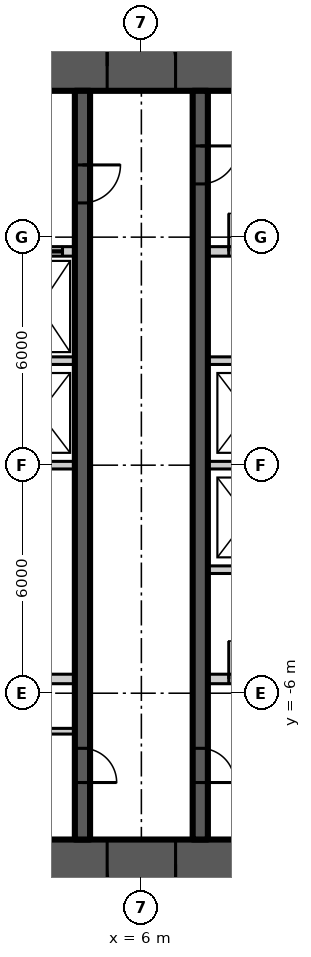
"""IFC4 building model, lengths in metres.
Left out: names, types, materials, properties, quantities, classifications, styles, units other than length and angle.
Written with IfcOpenShell. Run it as: python <this file> out.ifc"""

import sys

from ifc_helpers import new_model, si_unit, direction, frame, frame_2d, origin, place, context, subcontext, project, spatial, rectangle, extrude, element, fill, save


model = new_model("IFC4")
c1 = context("Model", 3, precision=1e-05, world=origin(), true_north=direction((0.0, 1.0)))
c2 = subcontext(c1, "Body", "Model", "MODEL_VIEW")
j1 = project(units=[si_unit("LENGTHUNIT", "METRE"), si_unit("PLANEANGLEUNIT", "RADIAN")], contexts=[c1])
p1 = place(None, origin())
s1 = spatial("IfcSite", under=j1, at=p1, CompositionType="ELEMENT")
p2 = place(p1, origin())
s2 = spatial("IfcBuilding", under=s1, at=p2, CompositionType="ELEMENT")
p3 = place(p2, frame((0.0, 0.0, 255.6)))
s3 = spatial("IfcBuildingStorey", under=s2, at=p3, CompositionType="ELEMENT", Elevation=255.6)
p4 = place(p3, frame((-11.15, 10.5, 0.0), z_axis=(0.0, 0.0, 1.0), x_axis=(1.0, 0.0, 0.0)))
e1 = element("IfcWall", 1, at=p4, inside=s3, PredefinedType="SHEAR", context=c2, shape_type="SweptSolid", body=[
    extrude(rectangle(XDim=22.3, YDim=1.3, at=frame_2d((11.15, 0.0))), origin(), (0.0, 0.0, 1.0), 3.9),
])
p5 = place(p4, frame((4.25, 0.0, 0.0)))
e2 = element("IfcOpeningElement", 2, at=p5, cuts=e1, PredefinedType="OPENING", context=c2, shape_type="SweptSolid", body=[
    extrude(rectangle(XDim=1.8, YDim=2.2, at=frame_2d((0.9, 1.1))), frame((0.0, 0.66, 0.0), z_axis=(0.0, -1.0, 0.0), x_axis=(1.0, 0.0, 0.0)), (0.0, 0.0, 1.0), 1.32),
])
p6 = place(p4, frame((16.25, 0.0, 0.0)))
e3 = element("IfcOpeningElement", 3, at=p6, cuts=e1, PredefinedType="OPENING", context=c2, shape_type="SweptSolid", body=[
    extrude(rectangle(XDim=1.8, YDim=2.2, at=frame_2d((0.9, 1.1))), frame((0.0, 0.66, 0.0), z_axis=(0.0, -1.0, 0.0), x_axis=(1.0, 0.0, 0.0)), (0.0, 0.0, 1.0), 1.32),
])
p7 = place(p3, frame((11.15, -10.5, 0.0), z_axis=(0.0, 0.0, 1.0), x_axis=(-1.0, 0.0, 0.0)))
e4 = element("IfcWall", 4, at=p7, inside=s3, PredefinedType="SHEAR", context=c2, shape_type="SweptSolid", body=[
    extrude(rectangle(XDim=22.3, YDim=1.3, at=frame_2d((11.15, 0.0))), origin(), (0.0, 0.0, 1.0), 3.9),
])
p8 = place(p7, frame((16.25, 0.0, 0.0)))
e5 = element("IfcOpeningElement", 5, at=p8, cuts=e4, PredefinedType="OPENING", context=c2, shape_type="SweptSolid", body=[
    extrude(rectangle(XDim=1.8, YDim=2.2, at=frame_2d((0.9, 1.1))), frame((0.0, 0.66, 0.0), z_axis=(0.0, -1.0, 0.0), x_axis=(1.0, 0.0, 0.0)), (0.0, 0.0, 1.0), 1.32),
])
p9 = place(p7, frame((4.25, 0.0, 0.0)))
e6 = element("IfcOpeningElement", 6, at=p9, cuts=e4, PredefinedType="OPENING", context=c2, shape_type="SweptSolid", body=[
    extrude(rectangle(XDim=1.8, YDim=2.2, at=frame_2d((0.9, 1.1))), frame((0.0, 0.66, 0.0), z_axis=(0.0, -1.0, 0.0), x_axis=(1.0, 0.0, 0.0)), (0.0, 0.0, 1.0), 1.32),
])
p10 = place(p3, frame((7.55, 9.85, 0.0), z_axis=(0.0, 0.0, 1.0), x_axis=(0.0, -1.0, 0.0)))
e7 = element("IfcWall", 7, at=p10, inside=s3, PredefinedType="SHEAR", context=c2, shape_type="SweptSolid", body=[
    extrude(rectangle(XDim=19.7, YDim=0.4, at=frame_2d((9.85, 0.0))), origin(), (0.0, 0.0, 1.0), 3.9),
])
p11 = place(p10, frame((1.45, 0.0, 0.0)))
e8 = element("IfcOpeningElement", 8, at=p11, cuts=e7, PredefinedType="OPENING", context=c2, shape_type="SweptSolid", body=[
    extrude(rectangle(XDim=1.0, YDim=2.2, at=frame_2d((0.5, 1.1))), frame((0.0, 0.21, 0.0), z_axis=(0.0, -1.0, 0.0), x_axis=(1.0, 0.0, 0.0)), (0.0, 0.0, 1.0), 0.42),
])
p12 = place(p10, frame((17.3, 0.0, 0.0)))
e9 = element("IfcOpeningElement", 9, at=p12, cuts=e7, PredefinedType="OPENING", context=c2, shape_type="SweptSolid", body=[
    extrude(rectangle(XDim=0.9, YDim=2.1, at=frame_2d((0.45, 1.05))), frame((0.0, 0.21, 0.0), z_axis=(0.0, -1.0, 0.0), x_axis=(1.0, 0.0, 0.0)), (0.0, 0.0, 1.0), 0.42),
])
p13 = place(p3, frame((4.45, 9.85, 0.0), z_axis=(0.0, 0.0, 1.0), x_axis=(0.0, -1.0, 0.0)))
e10 = element("IfcWall", 10, at=p13, inside=s3, PredefinedType="SHEAR", context=c2, shape_type="SweptSolid", body=[
    extrude(rectangle(XDim=19.7, YDim=0.4, at=frame_2d((9.85, 0.0))), origin(), (0.0, 0.0, 1.0), 3.9),
])
p14 = place(p13, frame((1.95, 0.0, 0.0)))
e11 = element("IfcOpeningElement", 11, at=p14, cuts=e10, PredefinedType="OPENING", context=c2, shape_type="SweptSolid", body=[
    extrude(rectangle(XDim=1.0, YDim=2.2, at=frame_2d((0.5, 1.1))), frame((0.0, 0.21, 0.0), z_axis=(0.0, -1.0, 0.0), x_axis=(1.0, 0.0, 0.0)), (0.0, 0.0, 1.0), 0.42),
])
p15 = place(p13, frame((17.3, 0.0, 0.0)))
e12 = element("IfcOpeningElement", 12, at=p15, cuts=e10, PredefinedType="OPENING", context=c2, shape_type="SweptSolid", body=[
    extrude(rectangle(XDim=0.9, YDim=2.1, at=frame_2d((0.45, 1.05))), frame((0.0, 0.21, 0.0), z_axis=(0.0, -1.0, 0.0), x_axis=(1.0, 0.0, 0.0)), (0.0, 0.0, 1.0), 0.42),
])
p16 = place(p3, frame((2.4, 5.625, 0.0), z_axis=(0.0, 0.0, 1.0), x_axis=(1.0, 0.0, 0.0)))
e13 = element("IfcWall", 13, at=p16, inside=s3, PredefinedType="SOLIDWALL", context=c2, shape_type="SweptSolid", body=[
    extrude(rectangle(XDim=1.85, YDim=0.25, at=frame_2d((0.925, 0.0))), origin(), (0.0, 0.0, 1.0), 3.7),
])
p17 = place(p16, frame((0.325, 0.0, 0.0)))
e14 = element("IfcOpeningElement", 14, at=p17, cuts=e13, PredefinedType="OPENING", context=c2, shape_type="SweptSolid", body=[
    extrude(rectangle(XDim=1.2, YDim=2.2, at=frame_2d((0.6, 1.1))), frame((0.0, 0.135, 0.0), z_axis=(0.0, -1.0, 0.0), x_axis=(1.0, 0.0, 0.0)), (0.0, 0.0, 1.0), 0.27),
])
p18 = place(p3, frame((7.75, 5.625, 0.0), z_axis=(0.0, 0.0, 1.0), x_axis=(1.0, 0.0, 0.0)))
e15 = element("IfcWall", 15, at=p18, inside=s3, PredefinedType="SOLIDWALL", context=c2, shape_type="SweptSolid", body=[
    extrude(rectangle(XDim=2.1, YDim=0.25, at=frame_2d((1.05, 0.0))), origin(), (0.0, 0.0, 1.0), 3.7),
])
p19 = place(p18, frame((0.55, 0.0, 0.0)))
e16 = element("IfcOpeningElement", 16, at=p19, cuts=e15, PredefinedType="OPENING", context=c2, shape_type="SweptSolid", body=[
    extrude(rectangle(XDim=1.0, YDim=2.2, at=frame_2d((0.5, 1.1))), frame((0.0, 0.135, 0.0), z_axis=(0.0, -1.0, 0.0), x_axis=(1.0, 0.0, 0.0)), (0.0, 0.0, 1.0), 0.27),
])
p20 = place(p3, frame((2.4, -5.625, 0.0), z_axis=(0.0, 0.0, 1.0), x_axis=(1.0, 0.0, 0.0)))
e17 = element("IfcWall", 17, at=p20, inside=s3, PredefinedType="SOLIDWALL", context=c2, shape_type="SweptSolid", body=[
    extrude(rectangle(XDim=1.85, YDim=0.25, at=frame_2d((0.925, 0.0))), origin(), (0.0, 0.0, 1.0), 3.7),
])
p21 = place(p3, frame((7.75, -5.625, 0.0), z_axis=(0.0, 0.0, 1.0), x_axis=(1.0, 0.0, 0.0)))
e18 = element("IfcWall", 18, at=p21, inside=s3, PredefinedType="SOLIDWALL", context=c2, shape_type="SweptSolid", body=[
    extrude(rectangle(XDim=2.1, YDim=0.25, at=frame_2d((1.05, 0.0))), origin(), (0.0, 0.0, 1.0), 3.7),
])
p22 = place(p21, frame((0.55, 0.0, 0.0)))
e19 = element("IfcOpeningElement", 19, at=p22, cuts=e18, PredefinedType="OPENING", context=c2, shape_type="SweptSolid", body=[
    extrude(rectangle(XDim=1.0, YDim=2.2, at=frame_2d((0.5, 1.1))), frame((0.0, 0.135, 0.0), z_axis=(0.0, -1.0, 0.0), x_axis=(1.0, 0.0, 0.0)), (0.0, 0.0, 1.0), 0.27),
])
p23 = place(p3, frame((7.75, -2.75, 0.0), z_axis=(0.0, 0.0, 1.0), x_axis=(1.0, 0.0, 0.0)))
e20 = element("IfcWall", 20, at=p23, inside=s3, PredefinedType="SOLIDWALL", context=c2, shape_type="SweptSolid", body=[
    extrude(rectangle(XDim=2.1, YDim=0.2, at=frame_2d((1.05, 0.0))), origin(), (0.0, 0.0, 1.0), 3.7),
])
p24 = place(p3, frame((2.4, 0.0, 0.0), z_axis=(0.0, 0.0, 1.0), x_axis=(1.0, 0.0, 0.0)))
e21 = element("IfcWall", 21, at=p24, inside=s3, PredefinedType="SOLIDWALL", context=c2, shape_type="SweptSolid", body=[
    extrude(rectangle(XDim=1.85, YDim=0.2, at=frame_2d((0.925, 0.0))), origin(), (0.0, 0.0, 1.0), 3.7),
])
p25 = place(p3, frame((7.75, 0.0, 0.0), z_axis=(0.0, 0.0, 1.0), x_axis=(1.0, 0.0, 0.0)))
e22 = element("IfcWall", 22, at=p25, inside=s3, PredefinedType="SOLIDWALL", context=c2, shape_type="SweptSolid", body=[
    extrude(rectangle(XDim=2.1, YDim=0.2, at=frame_2d((1.05, 0.0))), origin(), (0.0, 0.0, 1.0), 3.7),
])
p26 = place(p3, frame((2.4, 2.75, 0.0), z_axis=(0.0, 0.0, 1.0), x_axis=(1.0, 0.0, 0.0)))
e23 = element("IfcWall", 23, at=p26, inside=s3, PredefinedType="SOLIDWALL", context=c2, shape_type="SweptSolid", body=[
    extrude(rectangle(XDim=1.85, YDim=0.2, at=frame_2d((0.925, 0.0))), origin(), (0.0, 0.0, 1.0), 3.7),
])
p27 = place(p3, frame((7.75, 2.75, 0.0), z_axis=(0.0, 0.0, 1.0), x_axis=(1.0, 0.0, 0.0)))
e24 = element("IfcWall", 24, at=p27, inside=s3, PredefinedType="SOLIDWALL", context=c2, shape_type="SweptSolid", body=[
    extrude(rectangle(XDim=2.1, YDim=0.2, at=frame_2d((1.05, 0.0))), origin(), (0.0, 0.0, 1.0), 3.7),
])
p28 = place(p3, frame((2.4, -7.0, 0.0), z_axis=(0.0, 0.0, 1.0), x_axis=(1.0, 0.0, 0.0)))
e25 = element("IfcWall", 25, at=p28, inside=s3, PredefinedType="SOLIDWALL", context=c2, shape_type="SweptSolid", body=[
    extrude(rectangle(XDim=1.85, YDim=0.15, at=frame_2d((0.925, 0.0))), origin(), (0.0, 0.0, 1.0), 3.77),
])
p29 = place(p28, frame((0.1, 0.0, 0.0)))
e26 = element("IfcOpeningElement", 26, at=p29, cuts=e25, PredefinedType="OPENING", context=c2, shape_type="SweptSolid", body=[
    extrude(rectangle(XDim=0.9, YDim=2.1, at=frame_2d((0.45, 1.05))), frame((0.0, 0.085, 0.0), z_axis=(0.0, -1.0, 0.0), x_axis=(1.0, 0.0, 0.0)), (0.0, 0.0, 1.0), 0.17),
])
p30 = place(p6, origin())
e27 = element("IfcDoor", 27, at=p30, inside=s3, OperationType="DOUBLE_DOOR_DOUBLE_SWING", PredefinedType="DOOR", context=c2, shape_type="SweptSolid", body=[
    extrude(rectangle(XDim=1.8, YDim=2.2, at=frame_2d((0.9, 1.1))), frame((0.0, 0.025, 0.0), z_axis=(0.0, -1.0, 0.0), x_axis=(1.0, 0.0, 0.0)), (0.0, 0.0, 1.0), 0.05),
])
fill(e3, e27)
p31 = place(p9, origin())
e28 = element("IfcDoor", 28, at=p31, inside=s3, OperationType="DOUBLE_DOOR_DOUBLE_SWING", PredefinedType="DOOR", context=c2, shape_type="SweptSolid", body=[
    extrude(rectangle(XDim=1.8, YDim=2.2, at=frame_2d((0.9, 1.1))), frame((0.0, 0.025, 0.0), z_axis=(0.0, -1.0, 0.0), x_axis=(1.0, 0.0, 0.0)), (0.0, 0.0, 1.0), 0.05),
])
fill(e6, e28)
p32 = place(p11, origin())
e29 = element("IfcDoor", 29, at=p32, inside=s3, OperationType="SINGLE_SWING_LEFT", PredefinedType="DOOR", context=c2, shape_type="SweptSolid", body=[
    extrude(rectangle(XDim=1.0, YDim=2.2, at=frame_2d((0.5, 1.1))), frame((0.0, 0.025, 0.0), z_axis=(0.0, -1.0, 0.0), x_axis=(1.0, 0.0, 0.0)), (0.0, 0.0, 1.0), 0.05),
])
fill(e8, e29)
p33 = place(p14, origin())
e30 = element("IfcDoor", 30, at=p33, inside=s3, OperationType="SINGLE_SWING_LEFT", PredefinedType="DOOR", context=c2, shape_type="SweptSolid", body=[
    extrude(rectangle(XDim=1.0, YDim=2.2, at=frame_2d((0.5, 1.1))), frame((0.0, 0.025, 0.0), z_axis=(0.0, -1.0, 0.0), x_axis=(1.0, 0.0, 0.0)), (0.0, 0.0, 1.0), 0.05),
])
fill(e11, e30)
p34 = place(p12, origin())
e31 = element("IfcDoor", 31, at=p34, inside=s3, OperationType="SINGLE_SWING_RIGHT", PredefinedType="DOOR", context=c2, shape_type="SweptSolid", body=[
    extrude(rectangle(XDim=0.9, YDim=2.1, at=frame_2d((0.45, 1.05))), frame((0.0, 0.025, 0.0), z_axis=(0.0, -1.0, 0.0), x_axis=(1.0, 0.0, 0.0)), (0.0, 0.0, 1.0), 0.05),
])
fill(e9, e31)
p35 = place(p15, origin())
e32 = element("IfcDoor", 32, at=p35, inside=s3, OperationType="SINGLE_SWING_RIGHT", PredefinedType="DOOR", context=c2, shape_type="SweptSolid", body=[
    extrude(rectangle(XDim=0.9, YDim=2.1, at=frame_2d((0.45, 1.05))), frame((0.0, 0.025, 0.0), z_axis=(0.0, -1.0, 0.0), x_axis=(1.0, 0.0, 0.0)), (0.0, 0.0, 1.0), 0.05),
])
fill(e12, e32)
p36 = place(p17, origin())
e33 = element("IfcDoor", 33, at=p36, inside=s3, OperationType="SLIDING_TO_LEFT", PredefinedType="DOOR", context=c2, shape_type="SweptSolid", body=[
    extrude(rectangle(XDim=1.2, YDim=2.2, at=frame_2d((0.6, 1.1))), frame((0.0, 0.025, 0.0), z_axis=(0.0, -1.0, 0.0), x_axis=(1.0, 0.0, 0.0)), (0.0, 0.0, 1.0), 0.05),
])
fill(e14, e33)
p37 = place(p19, origin())
e34 = element("IfcDoor", 34, at=p37, inside=s3, OperationType="SINGLE_SWING_LEFT", PredefinedType="DOOR", context=c2, shape_type="SweptSolid", body=[
    extrude(rectangle(XDim=1.0, YDim=2.2, at=frame_2d((0.5, 1.1))), frame((0.0, 0.025, 0.0), z_axis=(0.0, -1.0, 0.0), x_axis=(1.0, 0.0, 0.0)), (0.0, 0.0, 1.0), 0.05),
])
fill(e16, e34)
p38 = place(p22, origin())
e35 = element("IfcDoor", 35, at=p38, inside=s3, OperationType="SINGLE_SWING_LEFT", PredefinedType="DOOR", context=c2, shape_type="SweptSolid", body=[
    extrude(rectangle(XDim=1.0, YDim=2.2, at=frame_2d((0.5, 1.1))), frame((0.0, 0.025, 0.0), z_axis=(0.0, -1.0, 0.0), x_axis=(1.0, 0.0, 0.0)), (0.0, 0.0, 1.0), 0.05),
])
fill(e19, e35)
save(model, sys.argv[1])
